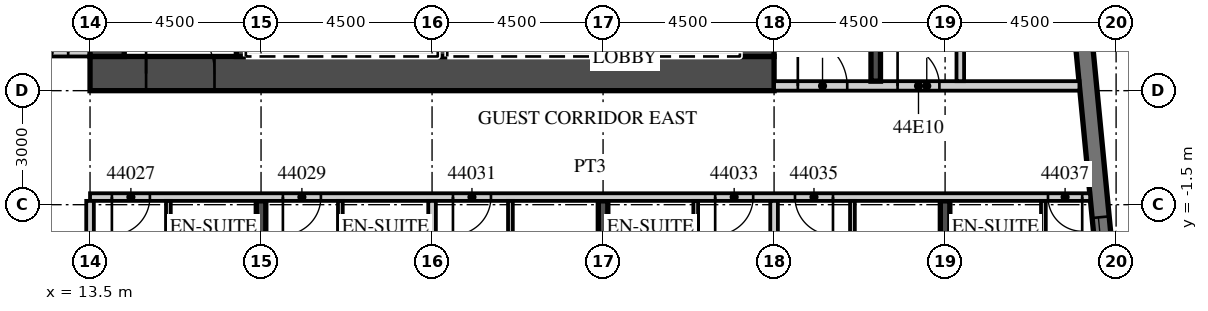
"""IFC4 building model, lengths in metres.
Left out: names, types, materials, properties, quantities, classifications, styles, units other than length and angle.
Written with IfcOpenShell. Run it as: python <this file> out.ifc"""

import sys

from ifc_helpers import new_model, si_unit, direction, frame, frame_2d, origin, place, context, subcontext, project, spatial, rectangle, extrude, element, fill, save


model = new_model("IFC4")
c1 = context("Model", 3, precision=1e-05, world=origin(), true_north=direction((0.0, 1.0)))
c2 = subcontext(c1, "Body", "Model", "MODEL_VIEW")
j1 = project(units=[si_unit("LENGTHUNIT", "METRE"), si_unit("PLANEANGLEUNIT", "RADIAN")], contexts=[c1])
p1 = place(None, origin())
s1 = spatial("IfcSite", under=j1, at=p1, CompositionType="ELEMENT")
p2 = place(p1, origin())
s2 = spatial("IfcBuilding", under=s1, at=p2, CompositionType="ELEMENT")
p3 = place(p2, frame((0.0, 0.0, 186.7)))
s3 = spatial("IfcBuildingStorey", under=s2, at=p3, CompositionType="ELEMENT", Elevation=186.7)
p4 = place(p3, frame((18.0, -19.245, 0.0), z_axis=(0.0, 0.0, 1.0), x_axis=(0.0, 1.0, 0.0)))
e1 = element("IfcWall", 1, at=p4, inside=s3, PredefinedType="SHEAR", context=c2, shape_type="SweptSolid", body=[
    extrude(rectangle(XDim=17.845, YDim=0.25, at=frame_2d((8.923, 0.0))), origin(), (0.0, 0.0, 1.0), 3.3),
])
p5 = place(p3, frame((27.0, -18.379, 0.0), z_axis=(0.0, 0.0, 1.0), x_axis=(0.0, 1.0, 0.0)))
e2 = element("IfcWall", 2, at=p5, inside=s3, PredefinedType="SHEAR", context=c2, shape_type="SweptSolid", body=[
    extrude(rectangle(XDim=16.979, YDim=0.25, at=frame_2d((8.489, 0.0))), origin(), (0.0, 0.0, 1.0), 3.3),
])
p6 = place(p3, frame((36.0, -17.512, 0.0), z_axis=(0.0, 0.0, 1.0), x_axis=(0.0, 1.0, 0.0)))
e3 = element("IfcWall", 3, at=p6, inside=s3, PredefinedType="SHEAR", context=c2, shape_type="SweptSolid", body=[
    extrude(rectangle(XDim=16.112, YDim=0.25, at=frame_2d((8.056, 0.0))), origin(), (0.0, 0.0, 1.0), 3.3),
])
p7 = place(p3, frame((41.214, -13.466, 0.0), z_axis=(0.0, 0.0, 1.0), x_axis=(-0.095847314626, 0.995396047952, 0.0)))
e4 = element("IfcWall", 4, at=p7, inside=s3, PredefinedType="SOLIDWALL", context=c2, shape_type="SweptSolid", body=[
    extrude(rectangle(XDim=34.0, YDim=0.45, at=frame_2d((17.0, 0.0))), origin(), (0.0, 0.0, 1.0), 3.02),
])
p8 = place(p7, frame((3.869, 0.0, 0.45)))
e5 = element("IfcOpeningElement", 5, at=p8, cuts=e4, PredefinedType="OPENING", context=c2, shape_type="SweptSolid", body=[
    extrude(rectangle(XDim=3.3, YDim=2.25, at=frame_2d((1.65, 1.125))), frame((0.0, 0.235, 0.0), z_axis=(0.0, -1.0, 0.0), x_axis=(1.0, 0.0, 0.0)), (0.0, 0.0, 1.0), 0.47),
])
p9 = place(p7, frame((8.39, 0.0, 0.45)))
e6 = element("IfcOpeningElement", 6, at=p9, cuts=e4, PredefinedType="OPENING", context=c2, shape_type="SweptSolid", body=[
    extrude(rectangle(XDim=3.3, YDim=2.25, at=frame_2d((1.65, 1.125))), frame((0.0, 0.235, 0.0), z_axis=(0.0, -1.0, 0.0), x_axis=(1.0, 0.0, 0.0)), (0.0, 0.0, 1.0), 0.47),
])
p10 = place(p3, frame((-13.5, 2.5, 0.0), z_axis=(0.0, 0.0, 1.0), x_axis=(1.0, 0.0, 0.0)))
e7 = element("IfcWall", 7, at=p10, inside=s3, PredefinedType="PARTITIONING", context=c2, shape_type="SweptSolid", body=[
    extrude(rectangle(XDim=27.0, YDim=0.2, at=frame_2d((13.5, 0.0))), origin(), (0.0, 0.0, 1.0), 3.02),
])
p11 = place(p10, frame((0.575, 0.0, 0.0)))
e8 = element("IfcOpeningElement", 8, at=p11, cuts=e7, PredefinedType="OPENING", context=c2, shape_type="SweptSolid", body=[
    extrude(rectangle(XDim=1.0, YDim=2.1, at=frame_2d((0.5, 1.05))), frame((0.0, 0.11, 0.0), z_axis=(0.0, -1.0, 0.0), x_axis=(1.0, 0.0, 0.0)), (0.0, 0.0, 1.0), 0.22),
])
p12 = place(p10, frame((9.863, 0.0, 0.0)))
e9 = element("IfcOpeningElement", 9, at=p12, cuts=e7, PredefinedType="OPENING", context=c2, shape_type="SweptSolid", body=[
    extrude(rectangle(XDim=1.2, YDim=2.1, at=frame_2d((0.6, 1.05))), frame((0.0, 0.11, 0.0), z_axis=(0.0, -1.0, 0.0), x_axis=(1.0, 0.0, 0.0)), (0.0, 0.0, 1.0), 0.22),
])
p13 = place(p10, frame((18.862, 0.0, 0.0)))
e10 = element("IfcOpeningElement", 10, at=p13, cuts=e7, PredefinedType="OPENING", context=c2, shape_type="SweptSolid", body=[
    extrude(rectangle(XDim=1.2, YDim=2.1, at=frame_2d((0.6, 1.05))), frame((0.0, 0.11, 0.0), z_axis=(0.0, -1.0, 0.0), x_axis=(1.0, 0.0, 0.0)), (0.0, 0.0, 1.0), 0.22),
])
p14 = place(p10, frame((25.425, 0.0, 0.0)))
e11 = element("IfcOpeningElement", 11, at=p14, cuts=e7, PredefinedType="OPENING", context=c2, shape_type="SweptSolid", body=[
    extrude(rectangle(XDim=1.0, YDim=2.1, at=frame_2d((0.5, 1.05))), frame((0.0, 0.11, 0.0), z_axis=(0.0, -1.0, 0.0), x_axis=(1.0, 0.0, 0.0)), (0.0, 0.0, 1.0), 0.22),
])
p15 = place(p3, frame((13.5, -1.3, 0.0), z_axis=(0.0, 0.0, 1.0), x_axis=(1.0, 0.0, 0.0)))
e12 = element("IfcWall", 12, at=p15, inside=s3, PredefinedType="PARTITIONING", context=c2, shape_type="SweptSolid", body=[
    extrude(rectangle(XDim=26.317, YDim=0.2, at=frame_2d((13.158, 0.0))), origin(), (0.0, 0.0, 1.0), 3.02),
])
p16 = place(p15, frame((0.575, 0.0, 0.0)))
e13 = element("IfcOpeningElement", 13, at=p16, cuts=e12, PredefinedType="OPENING", context=c2, shape_type="SweptSolid", body=[
    extrude(rectangle(XDim=1.0, YDim=2.1, at=frame_2d((0.5, 1.05))), frame((0.0, 0.11, 0.0), z_axis=(0.0, -1.0, 0.0), x_axis=(1.0, 0.0, 0.0)), (0.0, 0.0, 1.0), 0.22),
])
p17 = place(p15, frame((5.075, 0.0, 0.0)))
e14 = element("IfcOpeningElement", 14, at=p17, cuts=e12, PredefinedType="OPENING", context=c2, shape_type="SweptSolid", body=[
    extrude(rectangle(XDim=1.0, YDim=2.1, at=frame_2d((0.5, 1.05))), frame((0.0, 0.11, 0.0), z_axis=(0.0, -1.0, 0.0), x_axis=(1.0, 0.0, 0.0)), (0.0, 0.0, 1.0), 0.22),
])
p18 = place(p15, frame((9.55, 0.0, 0.0)))
e15 = element("IfcOpeningElement", 15, at=p18, cuts=e12, PredefinedType="OPENING", context=c2, shape_type="SweptSolid", body=[
    extrude(rectangle(XDim=1.0, YDim=2.1, at=frame_2d((0.5, 1.05))), frame((0.0, 0.11, 0.0), z_axis=(0.0, -1.0, 0.0), x_axis=(1.0, 0.0, 0.0)), (0.0, 0.0, 1.0), 0.22),
])
p19 = place(p15, frame((16.45, 0.0, 0.0)))
e16 = element("IfcOpeningElement", 16, at=p19, cuts=e12, PredefinedType="OPENING", context=c2, shape_type="SweptSolid", body=[
    extrude(rectangle(XDim=1.0, YDim=2.1, at=frame_2d((0.5, 1.05))), frame((0.0, 0.11, 0.0), z_axis=(0.0, -1.0, 0.0), x_axis=(1.0, 0.0, 0.0)), (0.0, 0.0, 1.0), 0.22),
])
p20 = place(p15, frame((18.55, 0.0, 0.0)))
e17 = element("IfcOpeningElement", 17, at=p20, cuts=e12, PredefinedType="OPENING", context=c2, shape_type="SweptSolid", body=[
    extrude(rectangle(XDim=1.0, YDim=2.1, at=frame_2d((0.5, 1.05))), frame((0.0, 0.11, 0.0), z_axis=(0.0, -1.0, 0.0), x_axis=(1.0, 0.0, 0.0)), (0.0, 0.0, 1.0), 0.22),
])
p21 = place(p15, frame((25.208, 0.0, 0.0)))
e18 = element("IfcOpeningElement", 18, at=p21, cuts=e12, PredefinedType="OPENING", context=c2, shape_type="SweptSolid", body=[
    extrude(rectangle(XDim=0.9, YDim=2.1, at=frame_2d((0.45, 1.05))), frame((0.0, 0.11, 0.0), z_axis=(0.0, -1.0, 0.0), x_axis=(1.0, 0.0, 0.0)), (0.0, 0.0, 1.0), 0.22),
])
p22 = place(p3, frame((13.5, -19.701, 0.0), z_axis=(0.0, 0.0, 1.0), x_axis=(0.0, 1.0, 0.0)))
e19 = element("IfcWall", 19, at=p22, inside=s3, PredefinedType="PARTITIONING", context=c2, shape_type="SweptSolid", body=[
    extrude(rectangle(XDim=18.301, YDim=0.2, at=frame_2d((9.15, 0.0))), origin(), (0.0, 0.0, 1.0), 3.02),
])
p23 = place(p3, frame((15.562, -5.125, 0.0), z_axis=(0.0, 0.0, 1.0), x_axis=(0.0, 1.0, 0.0)))
e20 = element("IfcWall", 20, at=p23, inside=s3, PredefinedType="PARTITIONING", context=c2, shape_type="SweptSolid", body=[
    extrude(rectangle(XDim=3.725, YDim=0.125, at=frame_2d((1.863, 0.0))), origin(), (0.0, 0.0, 1.0), 3.02),
])
p24 = place(p23, frame((0.375, 0.0, 0.0)))
e21 = element("IfcOpeningElement", 21, at=p24, cuts=e20, PredefinedType="OPENING", context=c2, shape_type="SweptSolid", body=[
    extrude(rectangle(XDim=0.9, YDim=2.1, at=frame_2d((0.45, 1.05))), frame((0.0, 0.073, 0.0), z_axis=(0.0, -1.0, 0.0), x_axis=(1.0, 0.0, 0.0)), (0.0, 0.0, 1.0), 0.145),
])
p25 = place(p3, frame((22.5, -18.834, 0.0), z_axis=(0.0, 0.0, 1.0), x_axis=(0.0, 1.0, 0.0)))
e22 = element("IfcWall", 22, at=p25, inside=s3, PredefinedType="PARTITIONING", context=c2, shape_type="SweptSolid", body=[
    extrude(rectangle(XDim=17.434, YDim=0.2, at=frame_2d((8.717, 0.0))), origin(), (0.0, 0.0, 1.0), 3.02),
])
p26 = place(p3, frame((20.087, -5.125, 0.0), z_axis=(0.0, 0.0, 1.0), x_axis=(0.0, 1.0, 0.0)))
e23 = element("IfcWall", 23, at=p26, inside=s3, PredefinedType="PARTITIONING", context=c2, shape_type="SweptSolid", body=[
    extrude(rectangle(XDim=3.725, YDim=0.125, at=frame_2d((1.863, 0.0))), origin(), (0.0, 0.0, 1.0), 3.02),
])
p27 = place(p26, frame((0.375, 0.0, 0.0)))
e24 = element("IfcOpeningElement", 24, at=p27, cuts=e23, PredefinedType="OPENING", context=c2, shape_type="SweptSolid", body=[
    extrude(rectangle(XDim=0.9, YDim=2.1, at=frame_2d((0.45, 1.05))), frame((0.0, 0.073, 0.0), z_axis=(0.0, -1.0, 0.0), x_axis=(1.0, 0.0, 0.0)), (0.0, 0.0, 1.0), 0.145),
])
p28 = place(p3, frame((24.562, -5.125, 0.0), z_axis=(0.0, 0.0, 1.0), x_axis=(0.0, 1.0, 0.0)))
e25 = element("IfcWall", 25, at=p28, inside=s3, PredefinedType="PARTITIONING", context=c2, shape_type="SweptSolid", body=[
    extrude(rectangle(XDim=3.725, YDim=0.125, at=frame_2d((1.863, 0.0))), origin(), (0.0, 0.0, 1.0), 3.02),
])
p29 = place(p28, frame((0.375, 0.0, 0.0)))
e26 = element("IfcOpeningElement", 26, at=p29, cuts=e25, PredefinedType="OPENING", context=c2, shape_type="SweptSolid", body=[
    extrude(rectangle(XDim=0.9, YDim=2.1, at=frame_2d((0.45, 1.05))), frame((0.0, 0.073, 0.0), z_axis=(0.0, -1.0, 0.0), x_axis=(1.0, 0.0, 0.0)), (0.0, 0.0, 1.0), 0.145),
])
p30 = place(p3, frame((31.5, -17.967, 0.0), z_axis=(0.0, 0.0, 1.0), x_axis=(0.0, 1.0, 0.0)))
e27 = element("IfcWall", 27, at=p30, inside=s3, PredefinedType="PARTITIONING", context=c2, shape_type="SweptSolid", body=[
    extrude(rectangle(XDim=16.567, YDim=0.2, at=frame_2d((8.284, 0.0))), origin(), (0.0, 0.0, 1.0), 3.02),
])
p31 = place(p3, frame((29.438, -5.125, 0.0), z_axis=(0.0, 0.0, 1.0), x_axis=(0.0, 1.0, 0.0)))
e28 = element("IfcWall", 28, at=p31, inside=s3, PredefinedType="PARTITIONING", context=c2, shape_type="SweptSolid", body=[
    extrude(rectangle(XDim=3.725, YDim=0.125, at=frame_2d((1.863, 0.0))), origin(), (0.0, 0.0, 1.0), 3.02),
])
p32 = place(p31, frame((0.375, 0.0, 0.0)))
e29 = element("IfcOpeningElement", 29, at=p32, cuts=e28, PredefinedType="OPENING", context=c2, shape_type="SweptSolid", body=[
    extrude(rectangle(XDim=0.9, YDim=2.1, at=frame_2d((0.45, 1.05))), frame((0.0, 0.073, 0.0), z_axis=(0.0, -1.0, 0.0), x_axis=(1.0, 0.0, 0.0)), (0.0, 0.0, 1.0), 0.145),
])
p33 = place(p3, frame((33.562, -5.125, 0.0), z_axis=(0.0, 0.0, 1.0), x_axis=(0.0, 1.0, 0.0)))
e30 = element("IfcWall", 30, at=p33, inside=s3, PredefinedType="PARTITIONING", context=c2, shape_type="SweptSolid", body=[
    extrude(rectangle(XDim=3.725, YDim=0.125, at=frame_2d((1.863, 0.0))), origin(), (0.0, 0.0, 1.0), 3.02),
])
p34 = place(p33, frame((0.375, 0.0, 0.0)))
e31 = element("IfcOpeningElement", 31, at=p34, cuts=e30, PredefinedType="OPENING", context=c2, shape_type="SweptSolid", body=[
    extrude(rectangle(XDim=0.9, YDim=2.1, at=frame_2d((0.45, 1.05))), frame((0.0, 0.073, 0.0), z_axis=(0.0, -1.0, 0.0), x_axis=(1.0, 0.0, 0.0)), (0.0, 0.0, 1.0), 0.145),
])
p35 = place(p3, frame((38.587, -5.125, 0.0), z_axis=(0.0, 0.0, 1.0), x_axis=(0.0, 1.0, 0.0)))
e32 = element("IfcWall", 32, at=p35, inside=s3, PredefinedType="PARTITIONING", context=c2, shape_type="SweptSolid", body=[
    extrude(rectangle(XDim=3.725, YDim=0.125, at=frame_2d((1.863, 0.0))), origin(), (0.0, 0.0, 1.0), 3.02),
])
p36 = place(p35, frame((0.375, 0.0, 0.0)))
e33 = element("IfcOpeningElement", 33, at=p36, cuts=e32, PredefinedType="OPENING", context=c2, shape_type="SweptSolid", body=[
    extrude(rectangle(XDim=0.9, YDim=2.1, at=frame_2d((0.45, 1.05))), frame((0.0, 0.073, 0.0), z_axis=(0.0, -1.0, 0.0), x_axis=(1.0, 0.0, 0.0)), (0.0, 0.0, 1.0), 0.145),
])
p37 = place(p3, frame((13.5, 1.95, 0.0), z_axis=(0.0, 0.0, 1.0), x_axis=(1.0, 0.0, 0.0)))
e34 = element("IfcWall", 34, at=p37, inside=s3, PredefinedType="SHEAR", context=c2, shape_type="SweptSolid", body=[
    extrude(rectangle(XDim=18.0, YDim=0.9, at=frame_2d((9.0, 0.0))), origin(), (0.0, 0.0, 1.0), 3.02),
])
p38 = place(p37, frame((1.475, 0.0, 0.0)))
e35 = element("IfcOpeningElement", 35, at=p38, cuts=e34, PredefinedType="OPENING", context=c2, shape_type="SweptSolid", body=[
    extrude(rectangle(XDim=1.8, YDim=2.1, at=frame_2d((0.9, 1.05))), frame((0.0, 0.46, 0.0), z_axis=(0.0, -1.0, 0.0), x_axis=(1.0, 0.0, 0.0)), (0.0, 0.0, 1.0), 0.92),
])
p39 = place(p3, frame((31.05, 2.4, 0.0), z_axis=(0.0, 0.0, 1.0), x_axis=(0.0, 1.0, 0.0)))
e36 = element("IfcWall", 36, at=p39, inside=s3, PredefinedType="SHEAR", context=c2, shape_type="SweptSolid", body=[
    extrude(rectangle(XDim=12.8, YDim=0.9, at=frame_2d((6.4, 0.0))), origin(), (0.0, 0.0, 1.0), 3.02),
])
p40 = place(p39, frame((0.2, 0.0, 0.0)))
e37 = element("IfcOpeningElement", 37, at=p40, cuts=e36, PredefinedType="OPENING", context=c2, shape_type="SweptSolid", body=[
    extrude(rectangle(XDim=1.1, YDim=2.1, at=frame_2d((0.55, 1.05))), frame((0.0, 0.46, 0.0), z_axis=(0.0, -1.0, 0.0), x_axis=(1.0, 0.0, 0.0)), (0.0, 0.0, 1.0), 0.92),
])
p41 = place(p3, frame((13.95, 2.4, 0.0), z_axis=(0.0, 0.0, 1.0), x_axis=(0.0, 1.0, 0.0)))
e38 = element("IfcWall", 38, at=p41, inside=s3, PredefinedType="SHEAR", context=c2, shape_type="SweptSolid", body=[
    extrude(rectangle(XDim=12.2, YDim=0.9, at=frame_2d((6.1, 0.0))), origin(), (0.0, 0.0, 1.0), 3.02),
])
p42 = place(p3, frame((17.475, 2.4, 0.0), z_axis=(0.0, 0.0, 1.0), x_axis=(0.0, 1.0, 0.0)))
e39 = element("IfcWall", 39, at=p42, inside=s3, PredefinedType="SHEAR", context=c2, shape_type="SweptSolid", body=[
    extrude(rectangle(XDim=3.15, YDim=0.25, at=frame_2d((1.575, 0.0))), origin(), (0.0, 0.0, 1.0), 3.02),
])
for number, where, z_axis, x_axis in (
    (40, (27.975, 2.4, 0.0), (0.0, 0.0, 1.0), (0.0, 1.0, 0.0)),
    (41, (22.775, 2.4, 0.0), (0.0, 0.0, 1.0), (0.0, 1.0, 0.0)),
):
    element("IfcWall", number, at=place(p3, frame(where, z_axis=z_axis, x_axis=x_axis)), inside=s3, PredefinedType="SHEAR", context=c2, shape_type="SweptSolid", body=[
        extrude(rectangle(XDim=2.9, YDim=0.25, at=frame_2d((1.45, 0.0))), origin(), (0.0, 0.0, 1.0), 3.02),
    ])
p43 = place(p3, frame((31.5, 1.625, 0.0), z_axis=(0.0, 0.0, 1.0), x_axis=(1.0, 0.0, 0.0)))
e42 = element("IfcWall", 42, at=p43, inside=s3, PredefinedType="PARTITIONING", context=c2, shape_type="SweptSolid", body=[
    extrude(rectangle(XDim=8.035, YDim=0.25, at=frame_2d((4.018, 0.0))), origin(), (0.0, 0.0, 1.0), 3.02),
])
p44 = place(p43, frame((0.625, 0.0, 0.0)))
e43 = element("IfcOpeningElement", 43, at=p44, cuts=e42, PredefinedType="OPENING", context=c2, shape_type="SweptSolid", body=[
    extrude(rectangle(XDim=1.3, YDim=2.1, at=frame_2d((0.65, 1.05))), frame((0.0, 0.135, 0.0), z_axis=(0.0, -1.0, 0.0), x_axis=(1.0, 0.0, 0.0)), (0.0, 0.0, 1.0), 0.27),
])
p45 = place(p43, frame((3.25, 0.0, 0.0)))
e44 = element("IfcOpeningElement", 44, at=p45, cuts=e42, PredefinedType="OPENING", context=c2, shape_type="SweptSolid", body=[
    extrude(rectangle(XDim=1.1, YDim=2.1, at=frame_2d((0.55, 1.05))), frame((0.0, 0.135, 0.0), z_axis=(0.0, -1.0, 0.0), x_axis=(1.0, 0.0, 0.0)), (0.0, 0.0, 1.0), 0.27),
])
p46 = place(p3, frame((34.175, 1.75, 0.0), z_axis=(0.0, 0.0, 1.0), x_axis=(0.0, 1.0, 0.0)))
e45 = element("IfcWall", 45, at=p46, inside=s3, PredefinedType="SHEAR", context=c2, shape_type="SweptSolid", body=[
    extrude(rectangle(XDim=8.35, YDim=0.25, at=frame_2d((4.175, 0.0))), origin(), (0.0, 0.0, 1.0), 3.02),
])
p47 = place(p3, frame((36.4, 1.75, 0.0), z_axis=(0.0, 0.0, 1.0), x_axis=(0.0, 1.0, 0.0)))
e46 = element("IfcWall", 46, at=p47, inside=s3, PredefinedType="PARTITIONING", context=c2, shape_type="SweptSolid", body=[
    extrude(rectangle(XDim=15.95, YDim=0.2, at=frame_2d((7.975, 0.0))), origin(), (0.0, 0.0, 1.0), 3.02),
])
p48 = place(p47, frame((14.7, 0.0, 0.0)))
e47 = element("IfcOpeningElement", 47, at=p48, cuts=e46, PredefinedType="OPENING", context=c2, shape_type="SweptSolid", body=[
    extrude(rectangle(XDim=0.9, YDim=2.1, at=frame_2d((0.45, 1.05))), frame((0.0, 0.11, 0.0), z_axis=(0.0, -1.0, 0.0), x_axis=(1.0, 0.0, 0.0)), (0.0, 0.0, 1.0), 0.22),
])
p49 = place(p9, origin())
e48 = element("IfcWindow", 48, at=p49, inside=s3, PartitioningType="SINGLE_PANEL", PredefinedType="WINDOW", context=c2, shape_type="SweptSolid", body=[
    extrude(rectangle(XDim=3.3, YDim=2.25, at=frame_2d((1.65, 1.125))), frame((0.0, 0.09, 0.0), z_axis=(0.0, -1.0, 0.0), x_axis=(1.0, 0.0, 0.0)), (0.0, 0.0, 1.0), 0.06),
])
fill(e6, e48)
p50 = place(p14, origin())
e49 = element("IfcDoor", 49, at=p50, inside=s3, OperationType="SINGLE_SWING_RIGHT", PredefinedType="DOOR", context=c2, shape_type="SweptSolid", body=[
    extrude(rectangle(XDim=1.0, YDim=2.1, at=frame_2d((0.5, 1.05))), frame((0.0, 0.025, 0.0), z_axis=(0.0, -1.0, 0.0), x_axis=(1.0, 0.0, 0.0)), (0.0, 0.0, 1.0), 0.05),
])
fill(e11, e49)
p51 = place(p16, origin())
e50 = element("IfcDoor", 50, at=p51, inside=s3, OperationType="SINGLE_SWING_LEFT", PredefinedType="DOOR", context=c2, shape_type="SweptSolid", body=[
    extrude(rectangle(XDim=1.0, YDim=2.1, at=frame_2d((0.5, 1.05))), frame((0.0, 0.025, 0.0), z_axis=(0.0, -1.0, 0.0), x_axis=(1.0, 0.0, 0.0)), (0.0, 0.0, 1.0), 0.05),
])
fill(e13, e50)
p52 = place(p17, origin())
e51 = element("IfcDoor", 51, at=p52, inside=s3, OperationType="SINGLE_SWING_LEFT", PredefinedType="DOOR", context=c2, shape_type="SweptSolid", body=[
    extrude(rectangle(XDim=1.0, YDim=2.1, at=frame_2d((0.5, 1.05))), frame((0.0, 0.025, 0.0), z_axis=(0.0, -1.0, 0.0), x_axis=(1.0, 0.0, 0.0)), (0.0, 0.0, 1.0), 0.05),
])
fill(e14, e51)
p53 = place(p18, origin())
e52 = element("IfcDoor", 52, at=p53, inside=s3, OperationType="SINGLE_SWING_LEFT", PredefinedType="DOOR", context=c2, shape_type="SweptSolid", body=[
    extrude(rectangle(XDim=1.0, YDim=2.1, at=frame_2d((0.5, 1.05))), frame((0.0, 0.025, 0.0), z_axis=(0.0, -1.0, 0.0), x_axis=(1.0, 0.0, 0.0)), (0.0, 0.0, 1.0), 0.05),
])
fill(e15, e52)
p54 = place(p19, origin())
e53 = element("IfcDoor", 53, at=p54, inside=s3, OperationType="SINGLE_SWING_LEFT", PredefinedType="DOOR", context=c2, shape_type="SweptSolid", body=[
    extrude(rectangle(XDim=1.0, YDim=2.1, at=frame_2d((0.5, 1.05))), frame((0.0, 0.025, 0.0), z_axis=(0.0, -1.0, 0.0), x_axis=(1.0, 0.0, 0.0)), (0.0, 0.0, 1.0), 0.05),
])
fill(e16, e53)
p55 = place(p20, origin())
e54 = element("IfcDoor", 54, at=p55, inside=s3, OperationType="SINGLE_SWING_RIGHT", PredefinedType="DOOR", context=c2, shape_type="SweptSolid", body=[
    extrude(rectangle(XDim=1.0, YDim=2.1, at=frame_2d((0.5, 1.05))), frame((0.0, 0.025, 0.0), z_axis=(0.0, -1.0, 0.0), x_axis=(1.0, 0.0, 0.0)), (0.0, 0.0, 1.0), 0.05),
])
fill(e17, e54)
p56 = place(p21, origin())
e55 = element("IfcDoor", 55, at=p56, inside=s3, OperationType="SINGLE_SWING_RIGHT", PredefinedType="DOOR", context=c2, shape_type="SweptSolid", body=[
    extrude(rectangle(XDim=0.9, YDim=2.1, at=frame_2d((0.45, 1.05))), frame((0.0, 0.025, 0.0), z_axis=(0.0, -1.0, 0.0), x_axis=(1.0, 0.0, 0.0)), (0.0, 0.0, 1.0), 0.05),
])
fill(e18, e55)
p57 = place(p38, origin())
e56 = element("IfcDoor", 56, at=p57, inside=s3, OperationType="DOUBLE_DOOR_DOUBLE_SWING", PredefinedType="DOOR", context=c2, shape_type="SweptSolid", body=[
    extrude(rectangle(XDim=1.8, YDim=2.1, at=frame_2d((0.9, 1.05))), frame((0.0, 0.025, 0.0), z_axis=(0.0, -1.0, 0.0), x_axis=(1.0, 0.0, 0.0)), (0.0, 0.0, 1.0), 0.05),
])
fill(e35, e56)
p58 = place(p44, origin())
e57 = element("IfcDoor", 57, at=p58, inside=s3, OperationType="SINGLE_SWING_LEFT", PredefinedType="DOOR", context=c2, shape_type="SweptSolid", body=[
    extrude(rectangle(XDim=1.3, YDim=2.1, at=frame_2d((0.65, 1.05))), frame((0.0, 0.025, 0.0), z_axis=(0.0, -1.0, 0.0), x_axis=(1.0, 0.0, 0.0)), (0.0, 0.0, 1.0), 0.05),
])
fill(e43, e57)
p59 = place(p45, origin())
e58 = element("IfcDoor", 58, at=p59, inside=s3, OperationType="SINGLE_SWING_LEFT", PredefinedType="DOOR", context=c2, shape_type="SweptSolid", body=[
    extrude(rectangle(XDim=1.1, YDim=2.1, at=frame_2d((0.55, 1.05))), frame((0.0, 0.025, 0.0), z_axis=(0.0, -1.0, 0.0), x_axis=(1.0, 0.0, 0.0)), (0.0, 0.0, 1.0), 0.05),
])
fill(e44, e58)
save(model, sys.argv[1])
